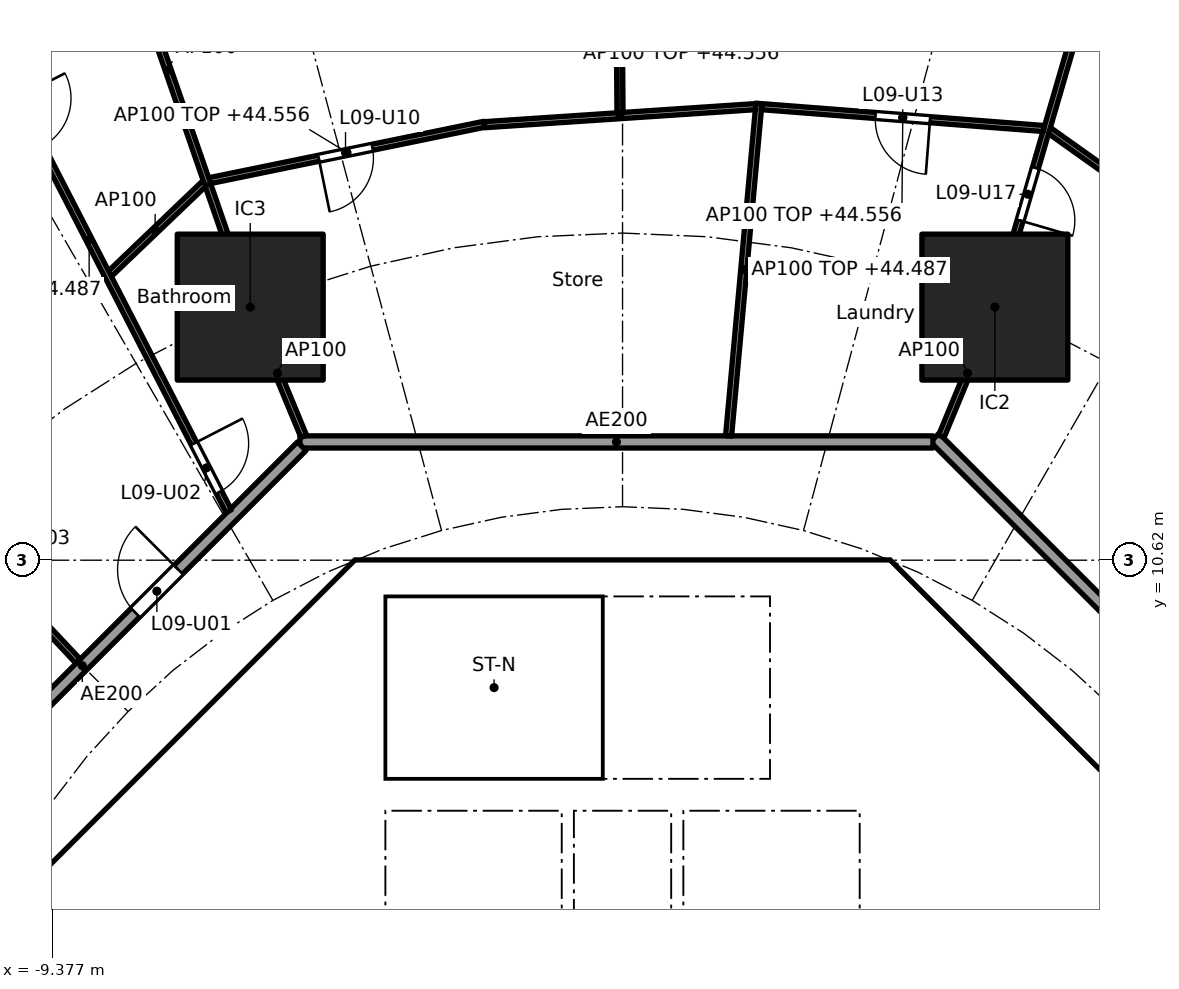
"""IFC4 building model, lengths in metres.
Left out: names, types, materials, properties, quantities, classifications, styles, units other than length and angle.
Written with IfcOpenShell. Run it as: python <this file> out.ifc"""

import sys

from ifc_helpers import new_model, si_unit, direction, frame, frame_2d, origin, origin_2d, place, context, subcontext, project, spatial, polyline, rectangle, outline, extrude, element, fill, save


model = new_model("IFC4")
c1 = context("Model", 3, precision=1e-05, world=origin(), true_north=direction((0.0, 1.0)))
c2 = subcontext(c1, "Body", "Model", "MODEL_VIEW")
j1 = project(units=[si_unit("LENGTHUNIT", "METRE"), si_unit("PLANEANGLEUNIT", "RADIAN")], contexts=[c1])
p1 = place(None, origin())
s1 = spatial("IfcSite", under=j1, at=p1, CompositionType="ELEMENT")
p2 = place(p1, origin())
s2 = spatial("IfcBuilding", under=s1, at=p2, CompositionType="ELEMENT")
p3 = place(p2, frame((0.0, 0.0, 41.8)))
s3 = spatial("IfcBuildingStorey", under=s2, at=p3, CompositionType="ELEMENT", Elevation=41.8)
for number, where, z_axis, x_axis in (
    (1, (6.123, 14.782, 0.0), (0.0, 0.0, 1.0), (1.0, 0.0, 0.0)),
    (2, (-6.123, 14.782, 0.0), (0.0, 0.0, 1.0), (1.0, 0.0, 0.0)),
):
    element("IfcColumn", number, at=place(p3, frame(where, z_axis=z_axis, x_axis=x_axis)), inside=s3, PredefinedType="COLUMN", context=c2, shape_type="SweptSolid", body=[
        extrude(rectangle(XDim=2.4, YDim=2.4, at=origin_2d()), origin(), (0.0, 0.0, 1.0), 3.7),
    ])
p4 = place(p3, frame((9.988, 4.613, 0.0), z_axis=(0.0, 0.0, 1.0), x_axis=(-0.707106781187, 0.707106781187, 0.0)))
e3 = element("IfcWall", 3, at=p4, inside=s3, PredefinedType="SHEAR", context=c2, shape_type="SweptSolid", body=[
    extrude(rectangle(XDim=7.602, YDim=0.6, at=frame_2d((3.801, 0.0))), origin(), (0.0, 0.0, 1.0), 3.44),
])
p5 = place(p4, frame((3.201, 0.0, 0.0)))
e4 = element("IfcOpeningElement", 4, at=p5, cuts=e3, PredefinedType="OPENING", context=c2, shape_type="SweptSolid", body=[
    extrude(rectangle(XDim=1.2, YDim=2.1, at=frame_2d((0.6, 1.05))), frame((0.0, 0.31, 0.0), z_axis=(0.0, -1.0, 0.0), x_axis=(1.0, 0.0, 0.0)), (0.0, 0.0, 1.0), 0.62),
])
p6 = place(p3, frame((-4.613, 9.988, 0.0), z_axis=(0.0, 0.0, 1.0), x_axis=(-0.707106781187, -0.707106781187, 0.0)))
e5 = element("IfcWall", 5, at=p6, inside=s3, PredefinedType="SHEAR", context=c2, shape_type="SweptSolid", body=[
    extrude(rectangle(XDim=7.602, YDim=0.6, at=frame_2d((3.801, 0.0))), origin(), (0.0, 0.0, 1.0), 3.44),
])
p7 = place(p6, frame((0.351, 0.0, 0.0)))
e6 = element("IfcOpeningElement", 6, at=p7, cuts=e5, PredefinedType="OPENING", context=c2, shape_type="SweptSolid", body=[
    extrude(rectangle(XDim=1.1, YDim=2.1, at=frame_2d((0.55, 1.05))), frame((0.0, 0.31, 0.0), z_axis=(0.0, -1.0, 0.0), x_axis=(1.0, 0.0, 0.0)), (0.0, 0.0, 1.0), 0.62),
])
p8 = place(p3, frame((-6.2, 4.3, 0.0), z_axis=(0.0, 0.0, 1.0), x_axis=(0.0, 1.0, 0.0)))
e7 = element("IfcWall", 7, at=p8, inside=s3, PredefinedType="PARTITIONING", context=c2, shape_type="SweptSolid", body=[
    extrude(rectangle(XDim=3.527, YDim=0.15, at=frame_2d((1.763, 0.0))), origin(), (0.0, 0.0, 1.0), 3.44),
])
p9 = place(p8, frame((0.262, 0.0, 0.0)))
e8 = element("IfcOpeningElement", 8, at=p9, cuts=e7, PredefinedType="OPENING", context=c2, shape_type="SweptSolid", body=[
    extrude(rectangle(XDim=0.9, YDim=2.1, at=frame_2d((0.45, 1.05))), frame((0.0, 0.085, 0.0), z_axis=(0.0, -1.0, 0.0), x_axis=(1.0, 0.0, 0.0)), (0.0, 0.0, 1.0), 0.17),
])
p10 = place(p8, frame((2.138, 0.0, 0.0)))
e9 = element("IfcOpeningElement", 9, at=p10, cuts=e7, PredefinedType="OPENING", context=c2, shape_type="SweptSolid", body=[
    extrude(rectangle(XDim=0.9, YDim=2.1, at=frame_2d((0.45, 1.05))), frame((0.0, 0.085, 0.0), z_axis=(0.0, -1.0, 0.0), x_axis=(1.0, 0.0, 0.0)), (0.0, 0.0, 1.0), 0.17),
])
p11 = place(p3, frame((4.0, 4.3, 0.0), z_axis=(0.0, 0.0, 1.0), x_axis=(0.0, 1.0, 0.0)))
e10 = element("IfcWall", 10, at=p11, inside=s3, PredefinedType="SOLIDWALL", context=c2, shape_type="SweptSolid", body=[
    extrude(rectangle(XDim=2.2, YDim=0.2, at=frame_2d((1.1, 0.0))), origin(), (0.0, 0.0, 1.0), 3.44),
])
p12 = place(p11, frame((0.55, 0.0, 0.0)))
e11 = element("IfcOpeningElement", 11, at=p12, cuts=e10, PredefinedType="OPENING", context=c2, shape_type="SweptSolid", body=[
    extrude(rectangle(XDim=1.1, YDim=2.1, at=frame_2d((0.55, 1.05))), frame((0.0, 0.11, 0.0), z_axis=(0.0, -1.0, 0.0), x_axis=(1.0, 0.0, 0.0)), (0.0, 0.0, 1.0), 0.22),
])
p13 = place(p3, frame((-4.0, 4.3, 0.0), z_axis=(0.0, 0.0, 1.0), x_axis=(0.0, 1.0, 0.0)))
e12 = element("IfcWall", 12, at=p13, inside=s3, PredefinedType="SOLIDWALL", context=c2, shape_type="SweptSolid", body=[
    extrude(rectangle(XDim=2.2, YDim=0.2, at=frame_2d((1.1, 0.0))), origin(), (0.0, 0.0, 1.0), 3.44),
])
p14 = place(p13, frame((0.55, 0.0, 0.0)))
e13 = element("IfcOpeningElement", 13, at=p14, cuts=e12, PredefinedType="OPENING", context=c2, shape_type="SweptSolid", body=[
    extrude(rectangle(XDim=1.1, YDim=2.1, at=frame_2d((0.55, 1.05))), frame((0.0, 0.11, 0.0), z_axis=(0.0, -1.0, 0.0), x_axis=(1.0, 0.0, 0.0)), (0.0, 0.0, 1.0), 0.22),
])
p15 = place(p3, frame((4.0, 7.025, 0.0), z_axis=(0.0, 0.0, 1.0), x_axis=(0.0, 1.0, 0.0)))
e14 = element("IfcWall", 14, at=p15, inside=s3, PredefinedType="SOLIDWALL", context=c2, shape_type="SweptSolid", body=[
    extrude(rectangle(XDim=3.0, YDim=0.2, at=frame_2d((1.5, 0.0))), origin(), (0.0, 0.0, 1.0), 3.44),
])
p16 = place(p15, frame((0.925, 0.0, 0.0)))
e15 = element("IfcOpeningElement", 15, at=p16, cuts=e14, PredefinedType="OPENING", context=c2, shape_type="SweptSolid", body=[
    extrude(rectangle(XDim=1.1, YDim=2.1, at=frame_2d((0.55, 1.05))), frame((0.0, 0.11, 0.0), z_axis=(0.0, -1.0, 0.0), x_axis=(1.0, 0.0, 0.0)), (0.0, 0.0, 1.0), 0.22),
])
p17 = place(p3, origin())
e16 = element("IfcWall", 16, at=p17, inside=s3, PredefinedType="SHEAR", context=c2, shape_type="SweptSolid", body=[
    extrude(outline(polyline([(-4.152, 10.025), (-4.401, 9.776), (-4.825, 10.2), (-4.401, 10.625), (4.401, 10.625), (4.825, 10.2), (4.401, 9.776), (4.152, 10.025), (-4.152, 10.025)])), origin(), (0.0, 0.0, 1.0), 3.44),
])
p18 = place(p3, frame((-8.301, 5.8, 0.0), z_axis=(0.0, 0.0, 1.0), x_axis=(1.0, 0.0, 0.0)))
e17 = element("IfcWall", 17, at=p18, inside=s3, PredefinedType="PARTITIONING", context=c2, shape_type="SweptSolid", body=[
    extrude(rectangle(XDim=2.026, YDim=0.15, at=frame_2d((1.013, 0.0))), origin(), (0.0, 0.0, 1.0), 3.44),
])
for number, where, z_axis, x_axis in (
    (18, (-0.9, 4.3, 0.0), (0.0, 0.0, 1.0), (0.0, 1.0, 0.0)),
    (19, (0.9, 4.3, 0.0), (0.0, 0.0, 1.0), (0.0, 1.0, 0.0)),
):
    element("IfcWall", number, at=place(p3, frame(where, z_axis=z_axis, x_axis=x_axis)), inside=s3, PredefinedType="SOLIDWALL", context=c2, shape_type="SweptSolid", body=[
        extrude(rectangle(XDim=2.2, YDim=0.2, at=frame_2d((1.1, 0.0))), origin(), (0.0, 0.0, 1.0), 3.44),
    ])
p19 = place(p3, origin())
e20 = element("IfcWall", 20, at=p19, inside=s3, PredefinedType="SOLIDWALL", context=c2, shape_type="SweptSolid", body=[
    extrude(outline(polyline([(-3.9, 7.025), (-4.1, 7.025), (-4.1, 10.025), (-3.9, 10.025), (-3.9, 7.025)])), origin(), (0.0, 0.0, 1.0), 3.44),
])
p20 = place(p3, origin())
e21 = element("IfcWall", 21, at=p20, inside=s3, PredefinedType="SOLIDWALL", context=c2, shape_type="SweptSolid", body=[
    extrude(outline(polyline([(4.1, 6.5), (-4.1, 6.5), (-4.1, 7.025), (4.1, 7.025), (4.1, 6.5)])), origin(), (0.0, 0.0, 1.0), 3.44),
])
p21 = place(p3, frame((12.635, 5.134, 0.0), z_axis=(0.0, 0.0, 1.0), x_axis=(-0.707106781187, 0.707106781187, 0.0)))
e22 = element("IfcWall", 22, at=p21, inside=s3, PredefinedType="PARTITIONING", context=c2, shape_type="SweptSolid", body=[
    extrude(rectangle(XDim=10.609, YDim=0.2, at=frame_2d((5.305, 0.0))), origin(), (0.0, 0.0, 1.0), 3.44),
])
p22 = place(p3, frame((5.104, 12.565, 0.0), z_axis=(0.0, 0.0, 1.0), x_axis=(-1.0, 0.0, 0.0)))
e23 = element("IfcWall", 23, at=p22, inside=s3, PredefinedType="PARTITIONING", context=c2, shape_type="SweptSolid", body=[
    extrude(rectangle(XDim=10.409, YDim=0.2, at=frame_2d((5.205, 0.0))), origin(), (0.0, 0.0, 1.0), 3.44),
])
p23 = place(p3, frame((-5.275, 12.494, 0.0), z_axis=(0.0, 0.0, 1.0), x_axis=(-0.707106781187, -0.707106781187, 0.0)))
e24 = element("IfcWall", 24, at=p23, inside=s3, PredefinedType="PARTITIONING", context=c2, shape_type="SweptSolid", body=[
    extrude(rectangle(XDim=10.209, YDim=0.2, at=frame_2d((5.104, 0.0))), origin(), (0.0, 0.0, 1.0), 3.44),
])
p24 = place(p23, frame((2.87, 0.0, 0.0)))
e25 = element("IfcOpeningElement", 25, at=p24, cuts=e24, PredefinedType="OPENING", context=c2, shape_type="SweptSolid", body=[
    extrude(rectangle(XDim=1.0, YDim=2.1, at=frame_2d((0.5, 1.05))), frame((0.0, 0.11, 0.0), z_axis=(0.0, -1.0, 0.0), x_axis=(1.0, 0.0, 0.0)), (0.0, 0.0, 1.0), 0.22),
])
p25 = place(p3, frame((9.989, 15.574, 0.0), z_axis=(0.0, 0.0, 1.0), x_axis=(-0.81494477814, 0.57953861699, 0.0)))
e26 = element("IfcWall", 26, at=p25, inside=s3, PredefinedType="PARTITIONING", context=c2, shape_type="SweptSolid", body=[
    extrude(rectangle(XDim=3.644, YDim=0.1, at=frame_2d((1.822, 0.0))), origin(), (0.0, 0.0, 1.0), 2.756),
])
p26 = place(p3, frame((5.243, 12.657, 0.0), z_axis=(0.0, 0.0, 1.0), x_axis=(0.382719158442, 0.923864733477, 0.0)))
e27 = element("IfcWall", 27, at=p26, inside=s3, PredefinedType="PARTITIONING", context=c2, shape_type="SweptSolid", body=[
    extrude(rectangle(XDim=2.25, YDim=0.1, at=frame_2d((1.125, 0.0))), origin(), (0.0, 0.0, 1.0), 3.44),
])
p27 = place(p3, frame((6.137, 14.83, 0.0), z_axis=(0.0, 0.0, 1.0), x_axis=(0.27985745069, 0.960041565399, 0.0)))
e28 = element("IfcWall", 28, at=p27, inside=s3, PredefinedType="PARTITIONING", context=c2, shape_type="SweptSolid", body=[
    extrude(rectangle(XDim=16.705, YDim=0.1, at=frame_2d((8.353, 0.0))), origin(), (0.0, 0.0, 1.0), 2.756),
])
p28 = place(p27, frame((6.091, 0.0, 0.0)))
e29 = element("IfcOpeningElement", 29, at=p28, cuts=e28, PredefinedType="OPENING", context=c2, shape_type="SweptSolid", body=[
    extrude(rectangle(XDim=0.9, YDim=2.1, at=frame_2d((0.45, 1.05))), frame((0.0, 0.06, 0.0), z_axis=(0.0, -1.0, 0.0), x_axis=(1.0, 0.0, 0.0)), (0.0, 0.0, 1.0), 0.12),
])
p29 = place(p27, frame((1.434, 0.0, 0.0)))
e30 = element("IfcOpeningElement", 30, at=p29, cuts=e28, PredefinedType="OPENING", context=c2, shape_type="SweptSolid", body=[
    extrude(rectangle(XDim=0.9, YDim=2.1, at=frame_2d((0.45, 1.05))), frame((0.0, 0.06, 0.0), z_axis=(0.0, -1.0, 0.0), x_axis=(1.0, 0.0, 0.0)), (0.0, 0.0, 1.0), 0.12),
])
p30 = place(p3, frame((6.928, 17.719, 0.0), z_axis=(0.0, 0.0, 1.0), x_axis=(-0.997017959142, 0.077169872028, 0.0)))
e31 = element("IfcWall", 31, at=p30, inside=s3, PredefinedType="PARTITIONING", context=c2, shape_type="SweptSolid", body=[
    extrude(rectangle(XDim=4.654, YDim=0.1, at=frame_2d((2.327, 0.0))), origin(), (0.0, 0.0, 1.0), 2.756),
])
p31 = place(p30, frame((1.877, 0.0, 0.0)))
e32 = element("IfcOpeningElement", 32, at=p31, cuts=e31, PredefinedType="OPENING", context=c2, shape_type="SweptSolid", body=[
    extrude(rectangle(XDim=0.9, YDim=2.1, at=frame_2d((0.45, 1.05))), frame((0.0, 0.06, 0.0), z_axis=(0.0, -1.0, 0.0), x_axis=(1.0, 0.0, 0.0)), (0.0, 0.0, 1.0), 0.12),
])
p32 = place(p3, frame((1.744, 12.664, 0.0), z_axis=(0.0, 0.0, 1.0), x_axis=(0.090888552747, 0.995861070119, 0.0)))
e33 = element("IfcWall", 33, at=p32, inside=s3, PredefinedType="PARTITIONING", context=c2, shape_type="SweptSolid", body=[
    extrude(rectangle(XDim=5.49, YDim=0.1, at=frame_2d((2.745, 0.0))), origin(), (0.0, 0.0, 1.0), 2.687),
])
p33 = place(p3, frame((2.188, 18.079, 0.0), z_axis=(0.0, 0.0, 1.0), x_axis=(-0.997791437766, -0.066424744789, 0.0)))
e34 = element("IfcWall", 34, at=p33, inside=s3, PredefinedType="PARTITIONING", context=c2, shape_type="SweptSolid", body=[
    extrude(rectangle(XDim=4.469, YDim=0.1, at=frame_2d((2.235, 0.0))), origin(), (0.0, 0.0, 1.0), 2.756),
])
p34 = place(p3, frame((-0.042, 17.98, 0.0), z_axis=(0.0, 0.0, 1.0), x_axis=(-0.007692080119, 0.999970415514, 0.0)))
e35 = element("IfcWall", 35, at=p34, inside=s3, PredefinedType="PARTITIONING", context=c2, shape_type="SweptSolid", body=[
    extrude(rectangle(XDim=6.856, YDim=0.1, at=frame_2d((3.428, 0.0))), origin(), (0.0, 0.0, 1.0), 3.44),
])
p35 = place(p3, frame((-2.272, 17.789, 0.0), z_axis=(0.0, 0.0, 1.0), x_axis=(-0.979587203416, -0.2010196779, 0.0)))
e36 = element("IfcWall", 36, at=p35, inside=s3, PredefinedType="PARTITIONING", context=c2, shape_type="SweptSolid", body=[
    extrude(rectangle(XDim=4.613, YDim=0.1, at=frame_2d((2.306, 0.0))), origin(), (0.0, 0.0, 1.0), 2.756),
])
p36 = place(p35, frame((1.881, 0.0, 0.0)))
e37 = element("IfcOpeningElement", 37, at=p36, cuts=e36, PredefinedType="OPENING", context=c2, shape_type="SweptSolid", body=[
    extrude(rectangle(XDim=0.9, YDim=2.1, at=frame_2d((0.45, 1.05))), frame((0.0, 0.06, 0.0), z_axis=(0.0, -1.0, 0.0), x_axis=(1.0, 0.0, 0.0)), (0.0, 0.0, 1.0), 0.12),
])
p37 = place(p3, frame((-5.243, 12.657, 0.0), z_axis=(0.0, 0.0, 1.0), x_axis=(-0.382719158442, 0.923864733477, 0.0)))
e38 = element("IfcWall", 38, at=p37, inside=s3, PredefinedType="PARTITIONING", context=c2, shape_type="SweptSolid", body=[
    extrude(rectangle(XDim=2.25, YDim=0.1, at=frame_2d((1.125, 0.0))), origin(), (0.0, 0.0, 1.0), 3.44),
])
p38 = place(p3, frame((-6.139, 14.829, 0.0), z_axis=(0.0, 0.0, 1.0), x_axis=(-0.327183700812, 0.944960753642, 0.0)))
e39 = element("IfcWall", 39, at=p38, inside=s3, PredefinedType="PARTITIONING", context=c2, shape_type="SweptSolid", body=[
    extrude(rectangle(XDim=8.14, YDim=0.1, at=frame_2d((4.07, 0.0))), origin(), (0.0, 0.0, 1.0), 3.44),
])
p39 = place(p3, frame((-6.876, 16.817, 0.0), z_axis=(0.0, 0.0, 1.0), x_axis=(-0.722762371977, -0.691096631199, 0.0)))
e40 = element("IfcWall", 40, at=p39, inside=s3, PredefinedType="PARTITIONING", context=c2, shape_type="SweptSolid", body=[
    extrude(rectangle(XDim=2.244, YDim=0.1, at=frame_2d((1.122, 0.0))), origin(), (0.0, 0.0, 1.0), 3.44),
])
p40 = place(p3, frame((-8.823, 22.441, 0.0), z_axis=(0.0, 0.0, 1.0), x_axis=(-0.741722263338, -0.670707152242, 0.0)))
e41 = element("IfcWall", 41, at=p40, inside=s3, PredefinedType="PARTITIONING", context=c2, shape_type="SweptSolid", body=[
    extrude(rectangle(XDim=6.109, YDim=0.1, at=frame_2d((3.055, 0.0))), origin(), (0.0, 0.0, 1.0), 2.756),
])
p41 = place(p3, frame((-6.477, 11.427, 0.0), z_axis=(0.0, 0.0, 1.0), x_axis=(-0.457464037982, 0.889228122561, 0.0)))
e42 = element("IfcWall", 42, at=p41, inside=s3, PredefinedType="PARTITIONING", context=c2, shape_type="SweptSolid", body=[
    extrude(rectangle(XDim=10.032, YDim=0.1, at=frame_2d((5.016, 0.0))), origin(), (0.0, 0.0, 1.0), 2.687),
])
p42 = place(p41, frame((0.35, 0.0, 0.0)))
e43 = element("IfcOpeningElement", 43, at=p42, cuts=e42, PredefinedType="OPENING", context=c2, shape_type="SweptSolid", body=[
    extrude(rectangle(XDim=0.9, YDim=2.1, at=frame_2d((0.45, 1.05))), frame((0.0, 0.06, 0.0), z_axis=(0.0, -1.0, 0.0), x_axis=(1.0, 0.0, 0.0)), (0.0, 0.0, 1.0), 0.12),
])
p43 = place(p41, frame((6.735, 0.0, 0.0)))
e44 = element("IfcOpeningElement", 44, at=p43, cuts=e42, PredefinedType="OPENING", context=c2, shape_type="SweptSolid", body=[
    extrude(rectangle(XDim=0.9, YDim=2.1, at=frame_2d((0.45, 1.05))), frame((0.0, 0.06, 0.0), z_axis=(0.0, -1.0, 0.0), x_axis=(1.0, 0.0, 0.0)), (0.0, 0.0, 1.0), 0.12),
])
p44 = place(p3, frame((-8.953, 8.958, 0.0), z_axis=(0.0, 0.0, 1.0), x_axis=(-0.684574307023, 0.728943082939, 0.0)))
e45 = element("IfcWall", 45, at=p44, inside=s3, PredefinedType="PARTITIONING", context=c2, shape_type="SweptSolid", body=[
    extrude(rectangle(XDim=15.231, YDim=0.1, at=frame_2d((7.615, 0.0))), origin(), (0.0, 0.0, 1.0), 2.687),
])
p45 = place(p44, frame((1.54, 0.0, 0.0)))
e46 = element("IfcOpeningElement", 46, at=p45, cuts=e45, PredefinedType="OPENING", context=c2, shape_type="SweptSolid", body=[
    extrude(rectangle(XDim=0.9, YDim=2.1, at=frame_2d((0.45, 1.05))), frame((0.0, 0.06, 0.0), z_axis=(0.0, -1.0, 0.0), x_axis=(1.0, 0.0, 0.0)), (0.0, 0.0, 1.0), 0.12),
])
p46 = place(p44, frame((6.174, 0.0, 0.0)))
e47 = element("IfcOpeningElement", 47, at=p46, cuts=e45, PredefinedType="OPENING", context=c2, shape_type="SweptSolid", body=[
    extrude(rectangle(XDim=0.9, YDim=2.1, at=frame_2d((0.45, 1.05))), frame((0.0, 0.06, 0.0), z_axis=(0.0, -1.0, 0.0), x_axis=(1.0, 0.0, 0.0)), (0.0, 0.0, 1.0), 0.12),
])
p47 = place(p44, frame((11.8, 0.0, 0.0)))
e48 = element("IfcOpeningElement", 48, at=p47, cuts=e45, PredefinedType="OPENING", context=c2, shape_type="SweptSolid", body=[
    extrude(rectangle(XDim=0.9, YDim=2.1, at=frame_2d((0.45, 1.05))), frame((0.0, 0.06, 0.0), z_axis=(0.0, -1.0, 0.0), x_axis=(1.0, 0.0, 0.0)), (0.0, 0.0, 1.0), 0.12),
])
p48 = place(p12, origin())
e49 = element("IfcDoor", 49, at=p48, inside=s3, OperationType="DOUBLE_DOOR_SLIDING", PredefinedType="DOOR", context=c2, shape_type="SweptSolid", body=[
    extrude(rectangle(XDim=1.1, YDim=2.1, at=frame_2d((0.55, 1.05))), frame((0.0, 0.025, 0.0), z_axis=(0.0, -1.0, 0.0), x_axis=(1.0, 0.0, 0.0)), (0.0, 0.0, 1.0), 0.05),
])
fill(e11, e49)
p49 = place(p14, origin())
e50 = element("IfcDoor", 50, at=p49, inside=s3, OperationType="DOUBLE_DOOR_SLIDING", PredefinedType="DOOR", context=c2, shape_type="SweptSolid", body=[
    extrude(rectangle(XDim=1.1, YDim=2.1, at=frame_2d((0.55, 1.05))), frame((0.0, 0.025, 0.0), z_axis=(0.0, -1.0, 0.0), x_axis=(1.0, 0.0, 0.0)), (0.0, 0.0, 1.0), 0.05),
])
fill(e13, e50)
p50 = place(p16, origin())
e51 = element("IfcDoor", 51, at=p50, inside=s3, OperationType="SINGLE_SWING_LEFT", PredefinedType="DOOR", context=c2, shape_type="SweptSolid", body=[
    extrude(rectangle(XDim=1.1, YDim=2.1, at=frame_2d((0.55, 1.05))), frame((0.0, 0.025, 0.0), z_axis=(0.0, -1.0, 0.0), x_axis=(1.0, 0.0, 0.0)), (0.0, 0.0, 1.0), 0.05),
])
fill(e15, e51)
p51 = place(p9, origin())
e52 = element("IfcDoor", 52, at=p51, inside=s3, OperationType="SINGLE_SWING_RIGHT", PredefinedType="DOOR", context=c2, shape_type="SweptSolid", body=[
    extrude(rectangle(XDim=0.9, YDim=2.1, at=frame_2d((0.45, 1.05))), frame((0.0, 0.025, 0.0), z_axis=(0.0, -1.0, 0.0), x_axis=(1.0, 0.0, 0.0)), (0.0, 0.0, 1.0), 0.05),
])
fill(e8, e52)
p52 = place(p10, origin())
e53 = element("IfcDoor", 53, at=p52, inside=s3, OperationType="SINGLE_SWING_RIGHT", PredefinedType="DOOR", context=c2, shape_type="SweptSolid", body=[
    extrude(rectangle(XDim=0.9, YDim=2.1, at=frame_2d((0.45, 1.05))), frame((0.0, 0.025, 0.0), z_axis=(0.0, -1.0, 0.0), x_axis=(1.0, 0.0, 0.0)), (0.0, 0.0, 1.0), 0.05),
])
fill(e9, e53)
p53 = place(p5, origin())
e54 = element("IfcDoor", 54, at=p53, inside=s3, OperationType="SINGLE_SWING_RIGHT", PredefinedType="DOOR", context=c2, shape_type="SweptSolid", body=[
    extrude(rectangle(XDim=1.2, YDim=2.1, at=frame_2d((0.6, 1.05))), frame((0.0, 0.025, 0.0), z_axis=(0.0, -1.0, 0.0), x_axis=(1.0, 0.0, 0.0)), (0.0, 0.0, 1.0), 0.05),
])
fill(e4, e54)
p54 = place(p7, origin())
e55 = element("IfcDoor", 55, at=p54, inside=s3, OperationType="SINGLE_SWING_RIGHT", PredefinedType="DOOR", context=c2, shape_type="SweptSolid", body=[
    extrude(rectangle(XDim=1.1, YDim=2.1, at=frame_2d((0.55, 1.05))), frame((0.0, 0.025, 0.0), z_axis=(0.0, -1.0, 0.0), x_axis=(1.0, 0.0, 0.0)), (0.0, 0.0, 1.0), 0.05),
])
fill(e6, e55)
p55 = place(p24, frame((1.0, 0.0, 0.0), x_axis=(-1.0, 0.0, 0.0)))
e56 = element("IfcDoor", 56, at=p55, inside=s3, OperationType="SINGLE_SWING_RIGHT", PredefinedType="DOOR", context=c2, shape_type="SweptSolid", body=[
    extrude(rectangle(XDim=1.0, YDim=2.1, at=frame_2d((0.5, 1.05))), frame((0.0, 0.025, 0.0), z_axis=(0.0, -1.0, 0.0), x_axis=(1.0, 0.0, 0.0)), (0.0, 0.0, 1.0), 0.05),
])
fill(e25, e56)
p56 = place(p42, frame((0.9, 0.0, 0.0), x_axis=(-1.0, 0.0, 0.0)))
e57 = element("IfcDoor", 57, at=p56, inside=s3, OperationType="SINGLE_SWING_LEFT", PredefinedType="DOOR", context=c2, shape_type="SweptSolid", body=[
    extrude(rectangle(XDim=0.9, YDim=2.1, at=frame_2d((0.45, 1.05))), frame((0.0, 0.025, 0.0), z_axis=(0.0, -1.0, 0.0), x_axis=(1.0, 0.0, 0.0)), (0.0, 0.0, 1.0), 0.05),
])
fill(e43, e57)
p57 = place(p36, origin())
e58 = element("IfcDoor", 58, at=p57, inside=s3, OperationType="SINGLE_SWING_RIGHT", PredefinedType="DOOR", context=c2, shape_type="SweptSolid", body=[
    extrude(rectangle(XDim=0.9, YDim=2.1, at=frame_2d((0.45, 1.05))), frame((0.0, 0.025, 0.0), z_axis=(0.0, -1.0, 0.0), x_axis=(1.0, 0.0, 0.0)), (0.0, 0.0, 1.0), 0.05),
])
fill(e37, e58)
p58 = place(p31, origin())
e59 = element("IfcDoor", 59, at=p58, inside=s3, OperationType="SINGLE_SWING_LEFT", PredefinedType="DOOR", context=c2, shape_type="SweptSolid", body=[
    extrude(rectangle(XDim=0.9, YDim=2.1, at=frame_2d((0.45, 1.05))), frame((0.0, 0.025, 0.0), z_axis=(0.0, -1.0, 0.0), x_axis=(1.0, 0.0, 0.0)), (0.0, 0.0, 1.0), 0.05),
])
fill(e32, e59)
p59 = place(p29, frame((0.9, 0.0, 0.0), x_axis=(-1.0, 0.0, 0.0)))
e60 = element("IfcDoor", 60, at=p59, inside=s3, OperationType="SINGLE_SWING_RIGHT", PredefinedType="DOOR", context=c2, shape_type="SweptSolid", body=[
    extrude(rectangle(XDim=0.9, YDim=2.1, at=frame_2d((0.45, 1.05))), frame((0.0, 0.025, 0.0), z_axis=(0.0, -1.0, 0.0), x_axis=(1.0, 0.0, 0.0)), (0.0, 0.0, 1.0), 0.05),
])
fill(e30, e60)
save(model, sys.argv[1])
